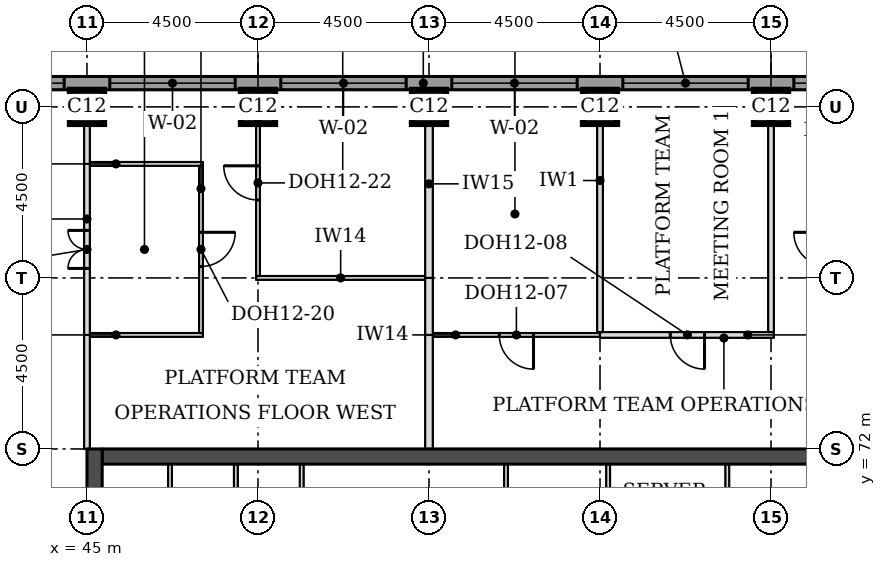
"""IFC4 building model, lengths in metres.
Left out: names, types, materials, properties, quantities, classifications, styles, units other than length and angle.
Written with IfcOpenShell. Run it as: python <this file> out.ifc"""

import sys

from ifc_helpers import new_model, si_unit, direction, frame, frame_2d, origin, origin_2d, place, context, subcontext, project, spatial, rectangle, extrude, element, fill, save


model = new_model("IFC4")
c1 = context("Model", 3, precision=1e-05, world=origin(), true_north=direction((0.0, 1.0)))
c2 = subcontext(c1, "Body", "Model", "MODEL_VIEW")
j1 = project(units=[si_unit("LENGTHUNIT", "METRE"), si_unit("PLANEANGLEUNIT", "RADIAN")], contexts=[c1])
p1 = place(None, origin())
s1 = spatial("IfcSite", under=j1, at=p1, CompositionType="ELEMENT")
p2 = place(p1, origin())
s2 = spatial("IfcBuilding", under=s1, at=p2, CompositionType="ELEMENT")
p3 = place(p2, frame((0.0, 0.0, 248.9)))
s3 = spatial("IfcBuildingStorey", under=s2, at=p3, CompositionType="ELEMENT", Elevation=248.9)
for number, where, z_axis, x_axis in (
    (1, (45.0, 81.0, 0.0), (0.0, 0.0, 1.0), (1.0, 0.0, 0.0)),
    (2, (49.5, 81.0, 0.0), (0.0, 0.0, 1.0), (1.0, 0.0, 0.0)),
    (3, (54.0, 81.0, 0.0), (0.0, 0.0, 1.0), (1.0, 0.0, 0.0)),
    (4, (58.5, 81.0, 0.0), (0.0, 0.0, 1.0), (1.0, 0.0, 0.0)),
    (5, (63.0, 81.0, 0.0), (0.0, 0.0, 1.0), (1.0, 0.0, 0.0)),
):
    element("IfcColumn", number, at=place(p3, frame(where, z_axis=z_axis, x_axis=x_axis)), inside=s3, PredefinedType="COLUMN", context=c2, shape_type="SweptSolid", body=[
        extrude(rectangle(XDim=0.9, YDim=0.9, at=origin_2d()), origin(), (0.0, 0.0, 1.0), 3.7),
    ])
p4 = place(p3, frame((45.4, 71.8, 0.0), z_axis=(0.0, 0.0, 1.0), x_axis=(1.0, 0.0, 0.0)))
e6 = element("IfcWall", 6, at=p4, inside=s3, PredefinedType="SHEAR", context=c2, shape_type="SweptSolid", body=[
    extrude(rectangle(XDim=21.7, YDim=0.4, at=frame_2d((10.85, 0.0))), origin(), (0.0, 0.0, 1.0), 3.7),
])
p5 = place(p3, frame((45.2, 49.5, 0.0), z_axis=(0.0, 0.0, 1.0), x_axis=(0.0, 1.0, 0.0)))
e7 = element("IfcWall", 7, at=p5, inside=s3, PredefinedType="SHEAR", context=c2, shape_type="SweptSolid", body=[
    extrude(rectangle(XDim=22.5, YDim=0.4, at=frame_2d((11.25, 0.0))), origin(), (0.0, 0.0, 1.0), 3.7),
])
p6 = place(p5, frame((4.2, 0.0, 0.0)))
e8 = element("IfcOpeningElement", 8, at=p6, cuts=e7, PredefinedType="OPENING", context=c2, shape_type="SweptSolid", body=[
    extrude(rectangle(XDim=1.8, YDim=2.1, at=frame_2d((0.9, 1.05))), frame((0.0, 0.21, 0.0), z_axis=(0.0, -1.0, 0.0), x_axis=(1.0, 0.0, 0.0)), (0.0, 0.0, 1.0), 0.42),
])
p7 = place(p5, frame((6.9, 0.0, 0.0)))
e9 = element("IfcOpeningElement", 9, at=p7, cuts=e7, PredefinedType="OPENING", context=c2, shape_type="SweptSolid", body=[
    extrude(rectangle(XDim=1.1, YDim=2.1, at=frame_2d((0.55, 1.05))), frame((0.0, 0.21, 0.0), z_axis=(0.0, -1.0, 0.0), x_axis=(1.0, 0.0, 0.0)), (0.0, 0.0, 1.0), 0.42),
])
p8 = place(p5, frame((13.6, 0.0, 0.0)))
e10 = element("IfcOpeningElement", 10, at=p8, cuts=e7, PredefinedType="OPENING", context=c2, shape_type="SweptSolid", body=[
    extrude(rectangle(XDim=1.1, YDim=2.1, at=frame_2d((0.55, 1.05))), frame((0.0, 0.21, 0.0), z_axis=(0.0, -1.0, 0.0), x_axis=(1.0, 0.0, 0.0)), (0.0, 0.0, 1.0), 0.42),
])
p9 = place(p5, frame((16.5, 0.0, 0.0)))
e11 = element("IfcOpeningElement", 11, at=p9, cuts=e7, PredefinedType="OPENING", context=c2, shape_type="SweptSolid", body=[
    extrude(rectangle(XDim=1.8, YDim=2.1, at=frame_2d((0.9, 1.05))), frame((0.0, 0.21, 0.0), z_axis=(0.0, -1.0, 0.0), x_axis=(1.0, 0.0, 0.0)), (0.0, 0.0, 1.0), 0.42),
])
p10 = place(p3, frame((72.331, 81.625, 0.0), z_axis=(0.0, 0.0, 1.0), x_axis=(-1.0, 0.0, 0.0)))
e12 = element("IfcWall", 12, at=p10, inside=s3, PredefinedType="STANDARD", context=c2, shape_type="SweptSolid", body=[
    extrude(rectangle(XDim=32.163, YDim=0.35, at=frame_2d((16.081, 0.0))), origin(), (0.0, 0.0, 1.0), 3.525),
])
p11 = place(p10, frame((0.931, 0.0, 0.9)))
e13 = element("IfcOpeningElement", 13, at=p11, cuts=e12, PredefinedType="OPENING", context=c2, shape_type="SweptSolid", body=[
    extrude(rectangle(XDim=3.3, YDim=1.9, at=frame_2d((1.65, 0.95))), frame((0.0, 0.185, 0.0), z_axis=(0.0, -1.0, 0.0), x_axis=(1.0, 0.0, 0.0)), (0.0, 0.0, 1.0), 0.37),
])
p12 = place(p10, frame((5.431, 0.0, 0.9)))
e14 = element("IfcOpeningElement", 14, at=p12, cuts=e12, PredefinedType="OPENING", context=c2, shape_type="SweptSolid", body=[
    extrude(rectangle(XDim=3.3, YDim=1.9, at=frame_2d((1.65, 0.95))), frame((0.0, 0.185, 0.0), z_axis=(0.0, -1.0, 0.0), x_axis=(1.0, 0.0, 0.0)), (0.0, 0.0, 1.0), 0.37),
])
p13 = place(p10, frame((9.931, 0.0, 0.9)))
e15 = element("IfcOpeningElement", 15, at=p13, cuts=e12, PredefinedType="OPENING", context=c2, shape_type="SweptSolid", body=[
    extrude(rectangle(XDim=3.3, YDim=1.9, at=frame_2d((1.65, 0.95))), frame((0.0, 0.185, 0.0), z_axis=(0.0, -1.0, 0.0), x_axis=(1.0, 0.0, 0.0)), (0.0, 0.0, 1.0), 0.37),
])
p14 = place(p10, frame((14.431, 0.0, 0.9)))
e16 = element("IfcOpeningElement", 16, at=p14, cuts=e12, PredefinedType="OPENING", context=c2, shape_type="SweptSolid", body=[
    extrude(rectangle(XDim=3.3, YDim=1.9, at=frame_2d((1.65, 0.95))), frame((0.0, 0.185, 0.0), z_axis=(0.0, -1.0, 0.0), x_axis=(1.0, 0.0, 0.0)), (0.0, 0.0, 1.0), 0.37),
])
p15 = place(p10, frame((18.931, 0.0, 0.9)))
e17 = element("IfcOpeningElement", 17, at=p15, cuts=e12, PredefinedType="OPENING", context=c2, shape_type="SweptSolid", body=[
    extrude(rectangle(XDim=3.3, YDim=1.9, at=frame_2d((1.65, 0.95))), frame((0.0, 0.185, 0.0), z_axis=(0.0, -1.0, 0.0), x_axis=(1.0, 0.0, 0.0)), (0.0, 0.0, 1.0), 0.37),
])
p16 = place(p10, frame((23.431, 0.0, 0.9)))
e18 = element("IfcOpeningElement", 18, at=p16, cuts=e12, PredefinedType="OPENING", context=c2, shape_type="SweptSolid", body=[
    extrude(rectangle(XDim=3.3, YDim=1.9, at=frame_2d((1.65, 0.95))), frame((0.0, 0.185, 0.0), z_axis=(0.0, -1.0, 0.0), x_axis=(1.0, 0.0, 0.0)), (0.0, 0.0, 1.0), 0.37),
])
p17 = place(p10, frame((27.931, 0.0, 0.9)))
e19 = element("IfcOpeningElement", 19, at=p17, cuts=e12, PredefinedType="OPENING", context=c2, shape_type="SweptSolid", body=[
    extrude(rectangle(XDim=3.3, YDim=1.9, at=frame_2d((1.65, 0.95))), frame((0.0, 0.185, 0.0), z_axis=(0.0, -1.0, 0.0), x_axis=(1.0, 0.0, 0.0)), (0.0, 0.0, 1.0), 0.37),
])
p18 = place(p3, frame((45.075, 75.0, 0.0), z_axis=(0.0, 0.0, 1.0), x_axis=(1.0, 0.0, 0.0)))
e20 = element("IfcWall", 20, at=p18, inside=s3, PredefinedType="PARTITIONING", context=c2, shape_type="SweptSolid", body=[
    extrude(rectangle(XDim=2.975, YDim=0.1, at=frame_2d((1.488, 0.0))), origin(), (0.0, 0.0, 1.0), 3.55),
])
p19 = place(p3, frame((54.1, 75.0, 0.0), z_axis=(0.0, 0.0, 1.0), x_axis=(1.0, 0.0, 0.0)))
e21 = element("IfcWall", 21, at=p19, inside=s3, PredefinedType="PARTITIONING", context=c2, shape_type="SweptSolid", body=[
    extrude(rectangle(XDim=4.4, YDim=0.1, at=frame_2d((2.2, 0.0))), origin(), (0.0, 0.0, 1.0), 3.55),
])
p20 = place(p19, frame((1.75, 0.0, 0.0)))
e22 = element("IfcOpeningElement", 22, at=p20, cuts=e21, PredefinedType="OPENING", context=c2, shape_type="SweptSolid", body=[
    extrude(rectangle(XDim=0.9, YDim=2.1, at=frame_2d((0.45, 1.05))), frame((0.0, 0.06, 0.0), z_axis=(0.0, -1.0, 0.0), x_axis=(1.0, 0.0, 0.0)), (0.0, 0.0, 1.0), 0.12),
])
p21 = place(p3, frame((58.5, 75.0, 0.0), z_axis=(0.0, 0.0, 1.0), x_axis=(1.0, 0.0, 0.0)))
e23 = element("IfcWall", 23, at=p21, inside=s3, PredefinedType="PARTITIONING", context=c2, shape_type="SweptSolid", body=[
    extrude(rectangle(XDim=4.575, YDim=0.15, at=frame_2d((2.288, 0.0))), origin(), (0.0, 0.0, 1.0), 3.55),
])
p22 = place(p21, frame((1.85, 0.0, 0.0)))
e24 = element("IfcOpeningElement", 24, at=p22, cuts=e23, PredefinedType="OPENING", context=c2, shape_type="SweptSolid", body=[
    extrude(rectangle(XDim=0.9, YDim=2.1, at=frame_2d((0.45, 1.05))), frame((0.0, 0.085, 0.0), z_axis=(0.0, -1.0, 0.0), x_axis=(1.0, 0.0, 0.0)), (0.0, 0.0, 1.0), 0.17),
])
p23 = place(p3, frame((49.45, 76.5, 0.0), z_axis=(0.0, 0.0, 1.0), x_axis=(1.0, 0.0, 0.0)))
e25 = element("IfcWall", 25, at=p23, inside=s3, PredefinedType="PARTITIONING", context=c2, shape_type="SweptSolid", body=[
    extrude(rectangle(XDim=4.45, YDim=0.1, at=frame_2d((2.225, 0.0))), origin(), (0.0, 0.0, 1.0), 3.55),
])
p24 = place(p3, frame((45.075, 79.5, 0.0), z_axis=(0.0, 0.0, 1.0), x_axis=(1.0, 0.0, 0.0)))
e26 = element("IfcWall", 26, at=p24, inside=s3, PredefinedType="PARTITIONING", context=c2, shape_type="SweptSolid", body=[
    extrude(rectangle(XDim=2.975, YDim=0.1, at=frame_2d((1.488, 0.0))), origin(), (0.0, 0.0, 1.0), 3.55),
])
p25 = place(p3, frame((45.0, 72.0, 0.0), z_axis=(0.0, 0.0, 1.0), x_axis=(0.0, 1.0, 0.0)))
e27 = element("IfcWall", 27, at=p25, inside=s3, PredefinedType="PARTITIONING", context=c2, shape_type="SweptSolid", body=[
    extrude(rectangle(XDim=3.0, YDim=0.15, at=frame_2d((1.5, 0.0))), origin(), (0.0, 0.0, 1.0), 3.022),
])
p26 = place(p3, frame((54.0, 72.0, 0.0), z_axis=(0.0, 0.0, 1.0), x_axis=(0.0, 1.0, 0.0)))
e28 = element("IfcWall", 28, at=p26, inside=s3, PredefinedType="PARTITIONING", context=c2, shape_type="SweptSolid", body=[
    extrude(rectangle(XDim=3.0, YDim=0.2, at=frame_2d((1.5, 0.0))), origin(), (0.0, 0.0, 1.0), 3.55),
])
p27 = place(p3, frame((45.0, 75.0, 0.0), z_axis=(0.0, 0.0, 1.0), x_axis=(0.0, 1.0, 0.0)))
e29 = element("IfcWall", 29, at=p27, inside=s3, PredefinedType="PARTITIONING", context=c2, shape_type="SweptSolid", body=[
    extrude(rectangle(XDim=4.5, YDim=0.15, at=frame_2d((2.25, 0.0))), origin(), (0.0, 0.0, 1.0), 3.022),
])
p28 = place(p27, frame((1.75, 0.0, 0.0)))
e30 = element("IfcOpeningElement", 30, at=p28, cuts=e29, PredefinedType="OPENING", context=c2, shape_type="SweptSolid", body=[
    extrude(rectangle(XDim=1.0, YDim=2.1, at=frame_2d((0.5, 1.05))), frame((0.0, 0.085, 0.0), z_axis=(0.0, -1.0, 0.0), x_axis=(1.0, 0.0, 0.0)), (0.0, 0.0, 1.0), 0.17),
])
p29 = place(p3, frame((54.0, 75.0, 0.0), z_axis=(0.0, 0.0, 1.0), x_axis=(0.0, 1.0, 0.0)))
e31 = element("IfcWall", 31, at=p29, inside=s3, PredefinedType="PARTITIONING", context=c2, shape_type="SweptSolid", body=[
    extrude(rectangle(XDim=1.5, YDim=0.2, at=frame_2d((0.75, 0.0))), origin(), (0.0, 0.0, 1.0), 3.55),
])
p30 = place(p3, frame((48.0, 75.05, 0.0), z_axis=(0.0, 0.0, 1.0), x_axis=(0.0, 1.0, 0.0)))
e32 = element("IfcWall", 32, at=p30, inside=s3, PredefinedType="PARTITIONING", context=c2, shape_type="SweptSolid", body=[
    extrude(rectangle(XDim=4.4, YDim=0.1, at=frame_2d((2.2, 0.0))), origin(), (0.0, 0.0, 1.0), 3.55),
])
p31 = place(p30, frame((1.75, 0.0, 0.0)))
e33 = element("IfcOpeningElement", 33, at=p31, cuts=e32, PredefinedType="OPENING", context=c2, shape_type="SweptSolid", body=[
    extrude(rectangle(XDim=0.9, YDim=2.1, at=frame_2d((0.45, 1.05))), frame((0.0, 0.06, 0.0), z_axis=(0.0, -1.0, 0.0), x_axis=(1.0, 0.0, 0.0)), (0.0, 0.0, 1.0), 0.12),
])
for number, where, z_axis, x_axis in (
    (34, (58.5, 75.075, 0.0), (0.0, 0.0, 1.0), (0.0, 1.0, 0.0)),
    (35, (63.0, 75.075, 0.0), (0.0, 0.0, 1.0), (0.0, 1.0, 0.0)),
):
    element("IfcWall", number, at=place(p3, frame(where, z_axis=z_axis, x_axis=x_axis)), inside=s3, PredefinedType="PARTITIONING", context=c2, shape_type="SweptSolid", body=[
        extrude(rectangle(XDim=6.375, YDim=0.15, at=frame_2d((3.188, 0.0))), origin(), (0.0, 0.0, 1.0), 3.55),
    ])
p32 = place(p3, frame((54.0, 76.5, 0.0), z_axis=(0.0, 0.0, 1.0), x_axis=(0.0, 1.0, 0.0)))
e36 = element("IfcWall", 36, at=p32, inside=s3, PredefinedType="PARTITIONING", context=c2, shape_type="SweptSolid", body=[
    extrude(rectangle(XDim=4.95, YDim=0.2, at=frame_2d((2.475, 0.0))), origin(), (0.0, 0.0, 1.0), 3.55),
])
p33 = place(p3, frame((49.5, 76.55, 0.0), z_axis=(0.0, 0.0, 1.0), x_axis=(0.0, 1.0, 0.0)))
e37 = element("IfcWall", 37, at=p33, inside=s3, PredefinedType="PARTITIONING", context=c2, shape_type="SweptSolid", body=[
    extrude(rectangle(XDim=4.9, YDim=0.1, at=frame_2d((2.45, 0.0))), origin(), (0.0, 0.0, 1.0), 3.55),
])
p34 = place(p33, frame((2.0, 0.0, 0.0)))
e38 = element("IfcOpeningElement", 38, at=p34, cuts=e37, PredefinedType="OPENING", context=c2, shape_type="SweptSolid", body=[
    extrude(rectangle(XDim=0.9, YDim=2.1, at=frame_2d((0.45, 1.05))), frame((0.0, 0.06, 0.0), z_axis=(0.0, -1.0, 0.0), x_axis=(1.0, 0.0, 0.0)), (0.0, 0.0, 1.0), 0.12),
])
p35 = place(p3, frame((45.0, 79.5, 0.0), z_axis=(0.0, 0.0, 1.0), x_axis=(0.0, 1.0, 0.0)))
e39 = element("IfcWall", 39, at=p35, inside=s3, PredefinedType="PARTITIONING", context=c2, shape_type="SweptSolid", body=[
    extrude(rectangle(XDim=1.95, YDim=0.15, at=frame_2d((0.975, 0.0))), origin(), (0.0, 0.0, 1.0), 3.022),
])
for number, where, z_axis, x_axis in (
    (40, (47.185, 68.5, 0.0), (0.0, 0.0, 1.0), (0.0, 1.0, 0.0)),
    (41, (48.917, 68.5, 0.0), (0.0, 0.0, 1.0), (0.0, 1.0, 0.0)),
    (42, (50.65, 68.5, 0.0), (0.0, 0.0, 1.0), (0.0, 1.0, 0.0)),
    (43, (56.026, 68.5, 0.0), (0.0, 0.0, 1.0), (0.0, 1.0, 0.0)),
    (44, (58.714, 68.5, 0.0), (0.0, 0.0, 1.0), (0.0, 1.0, 0.0)),
    (45, (61.85, 68.5, 0.0), (0.0, 0.0, 1.0), (0.0, 1.0, 0.0)),
):
    element("IfcWall", number, at=place(p3, frame(where, z_axis=z_axis, x_axis=x_axis)), inside=s3, PredefinedType="PARTITIONING", context=c2, shape_type="SweptSolid", body=[
        extrude(rectangle(XDim=3.1, YDim=0.1, at=frame_2d((1.55, 0.0))), origin(), (0.0, 0.0, 1.0), 3.55),
    ])
p36 = place(p12, origin())
e46 = element("IfcWindow", 46, at=p36, inside=s3, PartitioningType="SINGLE_PANEL", PredefinedType="WINDOW", context=c2, shape_type="SweptSolid", body=[
    extrude(rectangle(XDim=3.3, YDim=1.9, at=frame_2d((1.65, 0.95))), frame((0.0, 0.085, 0.0), z_axis=(0.0, -1.0, 0.0), x_axis=(1.0, 0.0, 0.0)), (0.0, 0.0, 1.0), 0.06),
])
fill(e14, e46)
p37 = place(p13, origin())
e47 = element("IfcWindow", 47, at=p37, inside=s3, PartitioningType="SINGLE_PANEL", PredefinedType="WINDOW", context=c2, shape_type="SweptSolid", body=[
    extrude(rectangle(XDim=3.3, YDim=1.9, at=frame_2d((1.65, 0.95))), frame((0.0, 0.085, 0.0), z_axis=(0.0, -1.0, 0.0), x_axis=(1.0, 0.0, 0.0)), (0.0, 0.0, 1.0), 0.06),
])
fill(e15, e47)
p38 = place(p14, origin())
e48 = element("IfcWindow", 48, at=p38, inside=s3, PartitioningType="SINGLE_PANEL", PredefinedType="WINDOW", context=c2, shape_type="SweptSolid", body=[
    extrude(rectangle(XDim=3.3, YDim=1.9, at=frame_2d((1.65, 0.95))), frame((0.0, 0.085, 0.0), z_axis=(0.0, -1.0, 0.0), x_axis=(1.0, 0.0, 0.0)), (0.0, 0.0, 1.0), 0.06),
])
fill(e16, e48)
p39 = place(p15, origin())
e49 = element("IfcWindow", 49, at=p39, inside=s3, PartitioningType="SINGLE_PANEL", PredefinedType="WINDOW", context=c2, shape_type="SweptSolid", body=[
    extrude(rectangle(XDim=3.3, YDim=1.9, at=frame_2d((1.65, 0.95))), frame((0.0, 0.085, 0.0), z_axis=(0.0, -1.0, 0.0), x_axis=(1.0, 0.0, 0.0)), (0.0, 0.0, 1.0), 0.06),
])
fill(e17, e49)
p40 = place(p16, origin())
e50 = element("IfcWindow", 50, at=p40, inside=s3, PartitioningType="SINGLE_PANEL", PredefinedType="WINDOW", context=c2, shape_type="SweptSolid", body=[
    extrude(rectangle(XDim=3.3, YDim=1.9, at=frame_2d((1.65, 0.95))), frame((0.0, 0.085, 0.0), z_axis=(0.0, -1.0, 0.0), x_axis=(1.0, 0.0, 0.0)), (0.0, 0.0, 1.0), 0.06),
])
fill(e18, e50)
p41 = place(p17, origin())
e51 = element("IfcWindow", 51, at=p41, inside=s3, PartitioningType="SINGLE_PANEL", PredefinedType="WINDOW", context=c2, shape_type="SweptSolid", body=[
    extrude(rectangle(XDim=3.3, YDim=1.9, at=frame_2d((1.65, 0.95))), frame((0.0, 0.085, 0.0), z_axis=(0.0, -1.0, 0.0), x_axis=(1.0, 0.0, 0.0)), (0.0, 0.0, 1.0), 0.06),
])
fill(e19, e51)
p42 = place(p28, origin())
e52 = element("IfcDoor", 52, at=p42, inside=s3, OperationType="DOUBLE_DOOR_SINGLE_SWING", PredefinedType="DOOR", context=c2, shape_type="SweptSolid", body=[
    extrude(rectangle(XDim=1.0, YDim=2.1, at=frame_2d((0.5, 1.05))), frame((0.0, 0.025, 0.0), z_axis=(0.0, -1.0, 0.0), x_axis=(1.0, 0.0, 0.0)), (0.0, 0.0, 1.0), 0.05),
])
fill(e30, e52)
p43 = place(p31, frame((0.9, 0.0, 0.0), z_axis=(0.0, 0.0, 1.0), x_axis=(-1.0, 0.0, 0.0)))
e53 = element("IfcDoor", 53, at=p43, inside=s3, OperationType="SINGLE_SWING_LEFT", PredefinedType="DOOR", context=c2, shape_type="SweptSolid", body=[
    extrude(rectangle(XDim=0.9, YDim=2.1, at=frame_2d((0.45, 1.05))), frame((0.0, 0.025, 0.0), z_axis=(0.0, -1.0, 0.0), x_axis=(1.0, 0.0, 0.0)), (0.0, 0.0, 1.0), 0.05),
])
fill(e33, e53)
p44 = place(p34, origin())
e54 = element("IfcDoor", 54, at=p44, inside=s3, OperationType="SINGLE_SWING_RIGHT", PredefinedType="DOOR", context=c2, shape_type="SweptSolid", body=[
    extrude(rectangle(XDim=0.9, YDim=2.1, at=frame_2d((0.45, 1.05))), frame((0.0, 0.025, 0.0), z_axis=(0.0, -1.0, 0.0), x_axis=(1.0, 0.0, 0.0)), (0.0, 0.0, 1.0), 0.05),
])
fill(e38, e54)
p45 = place(p20, frame((0.9, 0.0, 0.0), z_axis=(0.0, 0.0, 1.0), x_axis=(-1.0, 0.0, 0.0)))
e55 = element("IfcDoor", 55, at=p45, inside=s3, OperationType="SINGLE_SWING_LEFT", PredefinedType="DOOR", context=c2, shape_type="SweptSolid", body=[
    extrude(rectangle(XDim=0.9, YDim=2.1, at=frame_2d((0.45, 1.05))), frame((0.0, 0.025, 0.0), z_axis=(0.0, -1.0, 0.0), x_axis=(1.0, 0.0, 0.0)), (0.0, 0.0, 1.0), 0.05),
])
fill(e22, e55)
p46 = place(p22, frame((0.9, 0.0, 0.0), z_axis=(0.0, 0.0, 1.0), x_axis=(-1.0, 0.0, 0.0)))
e56 = element("IfcDoor", 56, at=p46, inside=s3, OperationType="SINGLE_SWING_LEFT", PredefinedType="DOOR", context=c2, shape_type="SweptSolid", body=[
    extrude(rectangle(XDim=0.9, YDim=2.1, at=frame_2d((0.45, 1.05))), frame((0.0, 0.025, 0.0), z_axis=(0.0, -1.0, 0.0), x_axis=(1.0, 0.0, 0.0)), (0.0, 0.0, 1.0), 0.05),
])
fill(e24, e56)
save(model, sys.argv[1])
